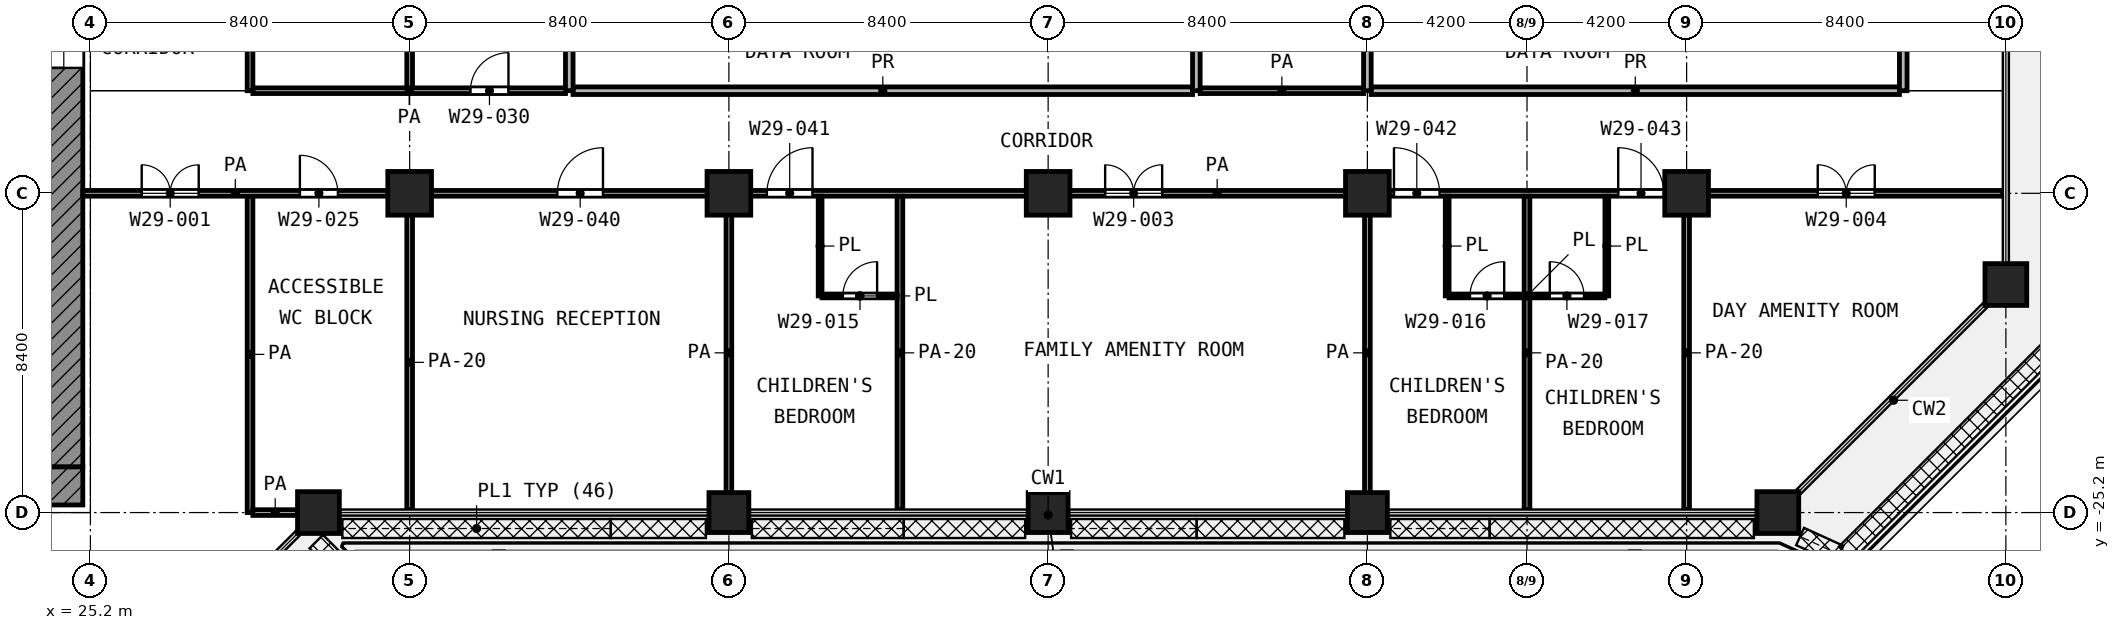
"""IFC4 building model, lengths in metres.
Left out: names, types, materials, properties, quantities, classifications, styles, units other than length and angle.
Written with IfcOpenShell. Run it as: python <this file> out.ifc"""

import sys

from ifc_helpers import new_model, si_unit, direction, frame, frame_2d, origin, origin_2d, place, context, subcontext, project, spatial, rectangle, extrude, element, fill, save


model = new_model("IFC4")
c1 = context("Model", 3, precision=1e-05, world=origin(), true_north=direction((0.0, 1.0)))
c2 = subcontext(c1, "Body", "Model", "MODEL_VIEW")
j1 = project(units=[si_unit("LENGTHUNIT", "METRE"), si_unit("PLANEANGLEUNIT", "RADIAN")], contexts=[c1])
p1 = place(None, origin())
s1 = spatial("IfcSite", under=j1, at=p1, CompositionType="ELEMENT")
p2 = place(p1, origin())
s2 = spatial("IfcBuilding", under=s1, at=p2, CompositionType="ELEMENT")
p3 = place(p2, frame((0.0, 0.0, 128.2)))
s3 = spatial("IfcBuildingStorey", under=s2, at=p3, CompositionType="ELEMENT", Elevation=128.2)
for number, where, z_axis, x_axis in (
    (1, (33.6, -16.8, 0.0), (0.0, 0.0, 1.0), (1.0, 0.0, 0.0)),
    (2, (42.0, -16.8, 0.0), (0.0, 0.0, 1.0), (1.0, 0.0, 0.0)),
    (3, (50.4, -16.8, 0.0), (0.0, 0.0, 1.0), (1.0, 0.0, 0.0)),
    (4, (58.8, -16.8, 0.0), (0.0, 0.0, 1.0), (1.0, 0.0, 0.0)),
    (5, (67.2, -16.8, 0.0), (0.0, 0.0, 1.0), (1.0, 0.0, 0.0)),
):
    element("IfcColumn", number, at=place(p3, frame(where, z_axis=z_axis, x_axis=x_axis)), inside=s3, PredefinedType="COLUMN", context=c2, shape_type="SweptSolid", body=[
        extrude(rectangle(XDim=1.15, YDim=1.15, at=origin_2d()), origin(), (0.0, 0.0, 1.0), 4.2),
    ])
for number, where, z_axis, x_axis in (
    (6, (75.6, -19.2, 0.0), (0.0, 0.0, 1.0), (1.0, 0.0, 0.0)),
    (7, (31.2, -25.2, 0.0), (0.0, 0.0, 1.0), (1.0, 0.0, 0.0)),
):
    element("IfcColumn", number, at=place(p3, frame(where, z_axis=z_axis, x_axis=x_axis)), inside=s3, PredefinedType="COLUMN", context=c2, shape_type="SweptSolid", body=[
        extrude(rectangle(XDim=1.1, YDim=1.1, at=origin_2d()), origin(), (0.0, 0.0, 1.0), 4.2),
    ])
for number, where, z_axis, x_axis in (
    (8, (42.0, -25.2, 0.0), (0.0, 0.0, 1.0), (1.0, 0.0, 0.0)),
    (9, (50.4, -25.2, 0.0), (0.0, 0.0, 1.0), (1.0, 0.0, 0.0)),
    (10, (58.8, -25.2, 0.0), (0.0, 0.0, 1.0), (1.0, 0.0, 0.0)),
):
    element("IfcColumn", number, at=place(p3, frame(where, z_axis=z_axis, x_axis=x_axis)), inside=s3, PredefinedType="COLUMN", context=c2, shape_type="SweptSolid", body=[
        extrude(rectangle(XDim=1.05, YDim=1.05, at=origin_2d()), origin(), (0.0, 0.0, 1.0), 4.2),
    ])
p4 = place(p3, frame((69.6, -25.2, 0.0), z_axis=(0.0, 0.0, 1.0), x_axis=(1.0, 0.0, 0.0)))
e11 = element("IfcColumn", 11, at=p4, inside=s3, PredefinedType="COLUMN", context=c2, shape_type="SweptSolid", body=[
    extrude(rectangle(XDim=1.1, YDim=1.1, at=origin_2d()), origin(), (0.0, 0.0, 1.0), 4.2),
])
p5 = place(p3, frame((24.5, -24.0, 0.0), z_axis=(0.0, 0.0, 1.0), x_axis=(0.0, 1.0, 0.0)))
e12 = element("IfcWall", 12, at=p5, inside=s3, PredefinedType="SHEAR", context=c2, shape_type="SweptSolid", body=[
    extrude(rectangle(XDim=18.6, YDim=1.0, at=frame_2d((9.3, 0.0))), origin(), (0.0, 0.0, 1.0), 3.6),
])
p6 = place(p5, frame((10.5, 0.0, 0.0)))
e13 = element("IfcOpeningElement", 13, at=p6, cuts=e12, PredefinedType="OPENING", context=c2, shape_type="SweptSolid", body=[
    extrude(rectangle(XDim=1.8, YDim=2.1, at=frame_2d((0.9, 1.05))), frame((0.0, 0.51, 0.0), z_axis=(0.0, -1.0, 0.0), x_axis=(1.0, 0.0, 0.0)), (0.0, 0.0, 1.0), 1.02),
])
p7 = place(p3, frame((24.5, -25.0, 0.0), z_axis=(0.0, 0.0, 1.0), x_axis=(0.0, 1.0, 0.0)))
e14 = element("IfcWall", 14, at=p7, inside=s3, PredefinedType="SHEAR", context=c2, shape_type="SweptSolid", body=[
    extrude(rectangle(XDim=1.0, YDim=1.0, at=frame_2d((0.5, 0.0))), origin(), (0.0, 0.0, 1.0), 3.6),
])
p8 = place(p3, frame((44.45, -19.5, 0.0), z_axis=(0.0, 0.0, 1.0), x_axis=(1.0, 0.0, 0.0)))
e15 = element("IfcWall", 15, at=p8, inside=s3, PredefinedType="PARTITIONING", context=c2, shape_type="SweptSolid", body=[
    extrude(rectangle(XDim=1.975, YDim=0.1, at=frame_2d((0.988, 0.0))), origin(), (0.0, 0.0, 1.0), 3.6),
])
p9 = place(p8, frame((0.55, 0.0, 0.0)))
e16 = element("IfcOpeningElement", 16, at=p9, cuts=e15, PredefinedType="OPENING", context=c2, shape_type="SweptSolid", body=[
    extrude(rectangle(XDim=0.9, YDim=2.1, at=frame_2d((0.45, 1.05))), frame((0.0, 0.06, 0.0), z_axis=(0.0, -1.0, 0.0), x_axis=(1.0, 0.0, 0.0)), (0.0, 0.0, 1.0), 0.12),
])
p10 = place(p3, frame((60.95, -19.5, 0.0), z_axis=(0.0, 0.0, 1.0), x_axis=(1.0, 0.0, 0.0)))
e17 = element("IfcWall", 17, at=p10, inside=s3, PredefinedType="PARTITIONING", context=c2, shape_type="SweptSolid", body=[
    extrude(rectangle(XDim=4.1, YDim=0.1, at=frame_2d((2.05, 0.0))), origin(), (0.0, 0.0, 1.0), 3.6),
])
p11 = place(p10, frame((0.55, 0.0, 0.0)))
e18 = element("IfcOpeningElement", 18, at=p11, cuts=e17, PredefinedType="OPENING", context=c2, shape_type="SweptSolid", body=[
    extrude(rectangle(XDim=0.9, YDim=2.1, at=frame_2d((0.45, 1.05))), frame((0.0, 0.06, 0.0), z_axis=(0.0, -1.0, 0.0), x_axis=(1.0, 0.0, 0.0)), (0.0, 0.0, 1.0), 0.12),
])
p12 = place(p10, frame((2.65, 0.0, 0.0)))
e19 = element("IfcOpeningElement", 19, at=p12, cuts=e17, PredefinedType="OPENING", context=c2, shape_type="SweptSolid", body=[
    extrude(rectangle(XDim=0.9, YDim=2.1, at=frame_2d((0.45, 1.05))), frame((0.0, 0.06, 0.0), z_axis=(0.0, -1.0, 0.0), x_axis=(1.0, 0.0, 0.0)), (0.0, 0.0, 1.0), 0.12),
])
for number, where, z_axis, x_axis in (
    (20, (44.4, -19.5, 0.0), (0.0, 0.0, 1.0), (0.0, 1.0, 0.0)),
    (21, (60.9, -19.5, 0.0), (0.0, 0.0, 1.0), (0.0, 1.0, 0.0)),
    (22, (65.1, -19.5, 0.0), (0.0, 0.0, 1.0), (0.0, 1.0, 0.0)),
):
    element("IfcWall", number, at=place(p3, frame(where, z_axis=z_axis, x_axis=x_axis)), inside=s3, PredefinedType="PARTITIONING", context=c2, shape_type="SweptSolid", body=[
        extrude(rectangle(XDim=2.625, YDim=0.1, at=frame_2d((1.312, 0.0))), origin(), (0.0, 0.0, 1.0), 3.6),
    ])
p13 = place(p3, frame((29.475, -25.2, 0.0), z_axis=(0.0, 0.0, 1.0), x_axis=(1.0, 0.0, 0.0)))
e23 = element("IfcWall", 23, at=p13, inside=s3, PredefinedType="PARTITIONING", context=c2, shape_type="SweptSolid", body=[
    extrude(rectangle(XDim=1.175, YDim=0.15, at=frame_2d((0.587, 0.0))), origin(), (0.0, 0.0, 1.0), 3.6),
])
p14 = place(p3, frame((25.0, -16.8, 0.0), z_axis=(0.0, 0.0, 1.0), x_axis=(1.0, 0.0, 0.0)))
e24 = element("IfcWall", 24, at=p14, inside=s3, PredefinedType="PARTITIONING", context=c2, shape_type="SweptSolid", body=[
    extrude(rectangle(XDim=8.025, YDim=0.15, at=frame_2d((4.012, 0.0))), origin(), (0.0, 0.0, 1.0), 3.6),
])
p15 = place(p14, frame((1.55, 0.0, 0.0)))
e25 = element("IfcOpeningElement", 25, at=p15, cuts=e24, PredefinedType="OPENING", context=c2, shape_type="SweptSolid", body=[
    extrude(rectangle(XDim=1.5, YDim=2.1, at=frame_2d((0.75, 1.05))), frame((0.0, 0.085, 0.0), z_axis=(0.0, -1.0, 0.0), x_axis=(1.0, 0.0, 0.0)), (0.0, 0.0, 1.0), 0.17),
])
p16 = place(p14, frame((5.712, 0.0, 0.0)))
e26 = element("IfcOpeningElement", 26, at=p16, cuts=e24, PredefinedType="OPENING", context=c2, shape_type="SweptSolid", body=[
    extrude(rectangle(XDim=1.0, YDim=2.1, at=frame_2d((0.5, 1.05))), frame((0.0, 0.085, 0.0), z_axis=(0.0, -1.0, 0.0), x_axis=(1.0, 0.0, 0.0)), (0.0, 0.0, 1.0), 0.17),
])
p17 = place(p3, frame((34.175, -16.8, 0.0), z_axis=(0.0, 0.0, 1.0), x_axis=(1.0, 0.0, 0.0)))
e27 = element("IfcWall", 27, at=p17, inside=s3, PredefinedType="PARTITIONING", context=c2, shape_type="SweptSolid", body=[
    extrude(rectangle(XDim=41.345, YDim=0.15, at=frame_2d((20.672, 0.0))), origin(), (0.0, 0.0, 1.0), 3.6),
])
p18 = place(p17, frame((3.312, 0.0, 0.0)))
e28 = element("IfcOpeningElement", 28, at=p18, cuts=e27, PredefinedType="OPENING", context=c2, shape_type="SweptSolid", body=[
    extrude(rectangle(XDim=1.2, YDim=2.1, at=frame_2d((0.6, 1.05))), frame((0.0, 0.085, 0.0), z_axis=(0.0, -1.0, 0.0), x_axis=(1.0, 0.0, 0.0)), (0.0, 0.0, 1.0), 0.17),
])
p19 = place(p17, frame((8.825, 0.0, 0.0)))
e29 = element("IfcOpeningElement", 29, at=p19, cuts=e27, PredefinedType="OPENING", context=c2, shape_type="SweptSolid", body=[
    extrude(rectangle(XDim=1.2, YDim=2.1, at=frame_2d((0.6, 1.05))), frame((0.0, 0.085, 0.0), z_axis=(0.0, -1.0, 0.0), x_axis=(1.0, 0.0, 0.0)), (0.0, 0.0, 1.0), 0.17),
])
p20 = place(p17, frame((17.725, 0.0, 0.0)))
e30 = element("IfcOpeningElement", 30, at=p20, cuts=e27, PredefinedType="OPENING", context=c2, shape_type="SweptSolid", body=[
    extrude(rectangle(XDim=1.5, YDim=2.1, at=frame_2d((0.75, 1.05))), frame((0.0, 0.085, 0.0), z_axis=(0.0, -1.0, 0.0), x_axis=(1.0, 0.0, 0.0)), (0.0, 0.0, 1.0), 0.17),
])
p21 = place(p17, frame((25.325, 0.0, 0.0)))
e31 = element("IfcOpeningElement", 31, at=p21, cuts=e27, PredefinedType="OPENING", context=c2, shape_type="SweptSolid", body=[
    extrude(rectangle(XDim=1.2, YDim=2.1, at=frame_2d((0.6, 1.05))), frame((0.0, 0.085, 0.0), z_axis=(0.0, -1.0, 0.0), x_axis=(1.0, 0.0, 0.0)), (0.0, 0.0, 1.0), 0.17),
])
p22 = place(p17, frame((31.225, 0.0, 0.0)))
e32 = element("IfcOpeningElement", 32, at=p22, cuts=e27, PredefinedType="OPENING", context=c2, shape_type="SweptSolid", body=[
    extrude(rectangle(XDim=1.2, YDim=2.1, at=frame_2d((0.6, 1.05))), frame((0.0, 0.085, 0.0), z_axis=(0.0, -1.0, 0.0), x_axis=(1.0, 0.0, 0.0)), (0.0, 0.0, 1.0), 0.17),
])
p23 = place(p17, frame((36.475, 0.0, 0.0)))
e33 = element("IfcOpeningElement", 33, at=p23, cuts=e27, PredefinedType="OPENING", context=c2, shape_type="SweptSolid", body=[
    extrude(rectangle(XDim=1.5, YDim=2.1, at=frame_2d((0.75, 1.05))), frame((0.0, 0.085, 0.0), z_axis=(0.0, -1.0, 0.0), x_axis=(1.0, 0.0, 0.0)), (0.0, 0.0, 1.0), 0.17),
])
p24 = place(p3, frame((29.475, -14.1, 0.0), z_axis=(0.0, 0.0, 1.0), x_axis=(1.0, 0.0, 0.0)))
e34 = element("IfcWall", 34, at=p24, inside=s3, PredefinedType="PARTITIONING", context=c2, shape_type="SweptSolid", body=[
    extrude(rectangle(XDim=8.225, YDim=0.15, at=frame_2d((4.112, 0.0))), origin(), (0.0, 0.0, 1.0), 3.6),
])
p25 = place(p24, frame((5.725, 0.0, 0.0)))
e35 = element("IfcOpeningElement", 35, at=p25, cuts=e34, PredefinedType="OPENING", context=c2, shape_type="SweptSolid", body=[
    extrude(rectangle(XDim=1.0, YDim=2.1, at=frame_2d((0.5, 1.05))), frame((0.0, 0.085, 0.0), z_axis=(0.0, -1.0, 0.0), x_axis=(1.0, 0.0, 0.0)), (0.0, 0.0, 1.0), 0.17),
])
p26 = place(p3, frame((54.4, -14.1, 0.0), z_axis=(0.0, 0.0, 1.0), x_axis=(1.0, 0.0, 0.0)))
e36 = element("IfcWall", 36, at=p26, inside=s3, PredefinedType="PARTITIONING", context=c2, shape_type="SweptSolid", body=[
    extrude(rectangle(XDim=4.3, YDim=0.15, at=frame_2d((2.15, 0.0))), origin(), (0.0, 0.0, 1.0), 3.6),
])
p27 = place(p3, frame((29.4, -25.2, 0.0), z_axis=(0.0, 0.0, 1.0), x_axis=(0.0, 1.0, 0.0)))
e37 = element("IfcWall", 37, at=p27, inside=s3, PredefinedType="PARTITIONING", context=c2, shape_type="SweptSolid", body=[
    extrude(rectangle(XDim=8.325, YDim=0.15, at=frame_2d((4.163, 0.0))), origin(), (0.0, 0.0, 1.0), 3.6),
])
p28 = place(p3, frame((29.4, -14.1, 0.0), z_axis=(0.0, 0.0, 1.0), x_axis=(0.0, 1.0, 0.0)))
e38 = element("IfcWall", 38, at=p28, inside=s3, PredefinedType="PARTITIONING", context=c2, shape_type="SweptSolid", body=[
    extrude(rectangle(XDim=3.0, YDim=0.15, at=frame_2d((1.5, 0.0))), origin(), (0.0, 0.0, 1.0), 3.6),
])
p29 = place(p3, frame((33.6, -25.12, 0.0), z_axis=(0.0, 0.0, 1.0), x_axis=(0.0, 1.0, 0.0)))
e39 = element("IfcWall", 39, at=p29, inside=s3, PredefinedType="PARTITIONING", context=c2, shape_type="SweptSolid", body=[
    extrude(rectangle(XDim=7.745, YDim=0.15, at=frame_2d((3.873, 0.0))), origin(), (0.0, 0.0, 1.0), 2.7),
])
p30 = place(p3, frame((33.6, -14.025, 0.0), z_axis=(0.0, 0.0, 1.0), x_axis=(0.0, 1.0, 0.0)))
e40 = element("IfcWall", 40, at=p30, inside=s3, PredefinedType="PARTITIONING", context=c2, shape_type="SweptSolid", body=[
    extrude(rectangle(XDim=2.85, YDim=0.15, at=frame_2d((1.425, 0.0))), origin(), (0.0, 0.0, 1.0), 3.6),
])
p31 = place(p3, frame((42.0, -25.12, 0.0), z_axis=(0.0, 0.0, 1.0), x_axis=(0.0, 1.0, 0.0)))
e41 = element("IfcWall", 41, at=p31, inside=s3, PredefinedType="PARTITIONING", context=c2, shape_type="SweptSolid", body=[
    extrude(rectangle(XDim=8.245, YDim=0.15, at=frame_2d((4.123, 0.0))), origin(), (0.0, 0.0, 1.0), 3.6),
])
p32 = place(p3, frame((46.5, -25.12, 0.0), z_axis=(0.0, 0.0, 1.0), x_axis=(0.0, 1.0, 0.0)))
e42 = element("IfcWall", 42, at=p32, inside=s3, PredefinedType="PARTITIONING", context=c2, shape_type="SweptSolid", body=[
    extrude(rectangle(XDim=8.245, YDim=0.15, at=frame_2d((4.123, 0.0))), origin(), (0.0, 0.0, 1.0), 2.7),
])
p33 = place(p3, frame((58.8, -25.12, 0.0), z_axis=(0.0, 0.0, 1.0), x_axis=(0.0, 1.0, 0.0)))
e43 = element("IfcWall", 43, at=p33, inside=s3, PredefinedType="PARTITIONING", context=c2, shape_type="SweptSolid", body=[
    extrude(rectangle(XDim=8.245, YDim=0.15, at=frame_2d((4.123, 0.0))), origin(), (0.0, 0.0, 1.0), 3.6),
])
for number, where, z_axis, x_axis in (
    (44, (63.0, -25.12, 0.0), (0.0, 0.0, 1.0), (0.0, 1.0, 0.0)),
    (45, (67.2, -25.12, 0.0), (0.0, 0.0, 1.0), (0.0, 1.0, 0.0)),
):
    element("IfcWall", number, at=place(p3, frame(where, z_axis=z_axis, x_axis=x_axis)), inside=s3, PredefinedType="PARTITIONING", context=c2, shape_type="SweptSolid", body=[
        extrude(rectangle(XDim=8.245, YDim=0.15, at=frame_2d((4.123, 0.0))), origin(), (0.0, 0.0, 1.0), 2.7),
    ])
p34 = place(p3, frame((37.9, -14.1, 0.0), z_axis=(0.0, 0.0, 1.0), x_axis=(1.0, 0.0, 0.0)))
e46 = element("IfcWall", 46, at=p34, inside=s3, PredefinedType="PARTITIONING", context=c2, shape_type="SweptSolid", body=[
    extrude(rectangle(XDim=16.3, YDim=0.2, at=frame_2d((8.15, 0.0))), origin(), (0.0, 0.0, 1.0), 3.6),
])
p35 = place(p3, frame((58.9, -14.1, 0.0), z_axis=(0.0, 0.0, 1.0), x_axis=(1.0, 0.0, 0.0)))
e47 = element("IfcWall", 47, at=p35, inside=s3, PredefinedType="PARTITIONING", context=c2, shape_type="SweptSolid", body=[
    extrude(rectangle(XDim=13.9, YDim=0.2, at=frame_2d((6.95, 0.0))), origin(), (0.0, 0.0, 1.0), 3.6),
])
for number, where, z_axis, x_axis in (
    (48, (37.8, -14.1, 0.0), (0.0, 0.0, 1.0), (0.0, 1.0, 0.0)),
    (49, (54.3, -14.1, 0.0), (0.0, 0.0, 1.0), (0.0, 1.0, 0.0)),
    (50, (58.8, -14.1, 0.0), (0.0, 0.0, 1.0), (0.0, 1.0, 0.0)),
    (51, (72.9, -14.1, 0.0), (0.0, 0.0, 1.0), (0.0, 1.0, 0.0)),
):
    element("IfcWall", number, at=place(p3, frame(where, z_axis=z_axis, x_axis=x_axis)), inside=s3, PredefinedType="PARTITIONING", context=c2, shape_type="SweptSolid", body=[
        extrude(rectangle(XDim=3.0, YDim=0.2, at=frame_2d((1.5, 0.0))), origin(), (0.0, 0.0, 1.0), 3.6),
    ])
p36 = place(p6, origin())
e52 = element("IfcDoor", 52, at=p36, inside=s3, OperationType="DOUBLE_DOOR_SINGLE_SWING", PredefinedType="DOOR", context=c2, shape_type="SweptSolid", body=[
    extrude(rectangle(XDim=1.8, YDim=2.1, at=frame_2d((0.9, 1.05))), frame((0.0, 0.025, 0.0), z_axis=(0.0, -1.0, 0.0), x_axis=(1.0, 0.0, 0.0)), (0.0, 0.0, 1.0), 0.05),
])
fill(e13, e52)
p37 = place(p15, origin())
e53 = element("IfcDoor", 53, at=p37, inside=s3, OperationType="DOUBLE_DOOR_SINGLE_SWING", PredefinedType="DOOR", context=c2, shape_type="SweptSolid", body=[
    extrude(rectangle(XDim=1.5, YDim=2.1, at=frame_2d((0.75, 1.05))), frame((0.0, 0.025, 0.0), z_axis=(0.0, -1.0, 0.0), x_axis=(1.0, 0.0, 0.0)), (0.0, 0.0, 1.0), 0.05),
])
fill(e25, e53)
p38 = place(p25, origin())
e54 = element("IfcDoor", 54, at=p38, inside=s3, OperationType="SINGLE_SWING_RIGHT", PredefinedType="DOOR", context=c2, shape_type="SweptSolid", body=[
    extrude(rectangle(XDim=1.0, YDim=2.1, at=frame_2d((0.5, 1.05))), frame((0.0, 0.025, 0.0), z_axis=(0.0, -1.0, 0.0), x_axis=(1.0, 0.0, 0.0)), (0.0, 0.0, 1.0), 0.05),
])
fill(e35, e54)
p39 = place(p16, origin())
e55 = element("IfcDoor", 55, at=p39, inside=s3, OperationType="SINGLE_SWING_LEFT", PredefinedType="DOOR", context=c2, shape_type="SweptSolid", body=[
    extrude(rectangle(XDim=1.0, YDim=2.1, at=frame_2d((0.5, 1.05))), frame((0.0, 0.025, 0.0), z_axis=(0.0, -1.0, 0.0), x_axis=(1.0, 0.0, 0.0)), (0.0, 0.0, 1.0), 0.05),
])
fill(e26, e55)
p40 = place(p18, origin())
e56 = element("IfcDoor", 56, at=p40, inside=s3, OperationType="SINGLE_SWING_RIGHT", PredefinedType="DOOR", context=c2, shape_type="SweptSolid", body=[
    extrude(rectangle(XDim=1.2, YDim=2.1, at=frame_2d((0.6, 1.05))), frame((0.0, 0.025, 0.0), z_axis=(0.0, -1.0, 0.0), x_axis=(1.0, 0.0, 0.0)), (0.0, 0.0, 1.0), 0.05),
])
fill(e28, e56)
p41 = place(p19, origin())
e57 = element("IfcDoor", 57, at=p41, inside=s3, OperationType="SINGLE_SWING_RIGHT", PredefinedType="DOOR", context=c2, shape_type="SweptSolid", body=[
    extrude(rectangle(XDim=1.2, YDim=2.1, at=frame_2d((0.6, 1.05))), frame((0.0, 0.025, 0.0), z_axis=(0.0, -1.0, 0.0), x_axis=(1.0, 0.0, 0.0)), (0.0, 0.0, 1.0), 0.05),
])
fill(e29, e57)
p42 = place(p9, origin())
e58 = element("IfcDoor", 58, at=p42, inside=s3, OperationType="SINGLE_SWING_RIGHT", PredefinedType="DOOR", context=c2, shape_type="SweptSolid", body=[
    extrude(rectangle(XDim=0.9, YDim=2.1, at=frame_2d((0.45, 1.05))), frame((0.0, 0.025, 0.0), z_axis=(0.0, -1.0, 0.0), x_axis=(1.0, 0.0, 0.0)), (0.0, 0.0, 1.0), 0.05),
])
fill(e16, e58)
p43 = place(p20, origin())
e59 = element("IfcDoor", 59, at=p43, inside=s3, OperationType="DOUBLE_DOOR_SINGLE_SWING", PredefinedType="DOOR", context=c2, shape_type="SweptSolid", body=[
    extrude(rectangle(XDim=1.5, YDim=2.1, at=frame_2d((0.75, 1.05))), frame((0.0, 0.025, 0.0), z_axis=(0.0, -1.0, 0.0), x_axis=(1.0, 0.0, 0.0)), (0.0, 0.0, 1.0), 0.05),
])
fill(e30, e59)
p44 = place(p21, origin())
e60 = element("IfcDoor", 60, at=p44, inside=s3, OperationType="SINGLE_SWING_LEFT", PredefinedType="DOOR", context=c2, shape_type="SweptSolid", body=[
    extrude(rectangle(XDim=1.2, YDim=2.1, at=frame_2d((0.6, 1.05))), frame((0.0, 0.025, 0.0), z_axis=(0.0, -1.0, 0.0), x_axis=(1.0, 0.0, 0.0)), (0.0, 0.0, 1.0), 0.05),
])
fill(e31, e60)
p45 = place(p11, origin())
e61 = element("IfcDoor", 61, at=p45, inside=s3, OperationType="SINGLE_SWING_RIGHT", PredefinedType="DOOR", context=c2, shape_type="SweptSolid", body=[
    extrude(rectangle(XDim=0.9, YDim=2.1, at=frame_2d((0.45, 1.05))), frame((0.0, 0.025, 0.0), z_axis=(0.0, -1.0, 0.0), x_axis=(1.0, 0.0, 0.0)), (0.0, 0.0, 1.0), 0.05),
])
fill(e18, e61)
p46 = place(p22, origin())
e62 = element("IfcDoor", 62, at=p46, inside=s3, OperationType="SINGLE_SWING_LEFT", PredefinedType="DOOR", context=c2, shape_type="SweptSolid", body=[
    extrude(rectangle(XDim=1.2, YDim=2.1, at=frame_2d((0.6, 1.05))), frame((0.0, 0.025, 0.0), z_axis=(0.0, -1.0, 0.0), x_axis=(1.0, 0.0, 0.0)), (0.0, 0.0, 1.0), 0.05),
])
fill(e32, e62)
p47 = place(p12, origin())
e63 = element("IfcDoor", 63, at=p47, inside=s3, OperationType="SINGLE_SWING_LEFT", PredefinedType="DOOR", context=c2, shape_type="SweptSolid", body=[
    extrude(rectangle(XDim=0.9, YDim=2.1, at=frame_2d((0.45, 1.05))), frame((0.0, 0.025, 0.0), z_axis=(0.0, -1.0, 0.0), x_axis=(1.0, 0.0, 0.0)), (0.0, 0.0, 1.0), 0.05),
])
fill(e19, e63)
p48 = place(p23, origin())
e64 = element("IfcDoor", 64, at=p48, inside=s3, OperationType="DOUBLE_DOOR_SINGLE_SWING", PredefinedType="DOOR", context=c2, shape_type="SweptSolid", body=[
    extrude(rectangle(XDim=1.5, YDim=2.1, at=frame_2d((0.75, 1.05))), frame((0.0, 0.025, 0.0), z_axis=(0.0, -1.0, 0.0), x_axis=(1.0, 0.0, 0.0)), (0.0, 0.0, 1.0), 0.05),
])
fill(e33, e64)
save(model, sys.argv[1])
